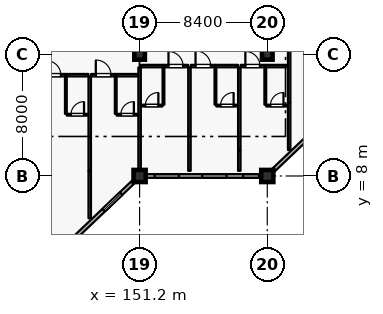
"""IFC4 building model, lengths in metres.
Left out: names, types, materials, properties, quantities, classifications, styles, units other than length and angle.
Written with IfcOpenShell. Run it as: python <this file> out.ifc"""

import sys

from ifc_helpers import new_model, si_unit, direction, frame, frame_2d, origin, origin_2d, place, context, subcontext, project, spatial, rectangle, extrude, element, fill, save


model = new_model("IFC4")
c1 = context("Model", 3, precision=1e-05, world=origin(), true_north=direction((0.0, 1.0)))
c2 = subcontext(c1, "Body", "Model", "MODEL_VIEW")
j1 = project(units=[si_unit("LENGTHUNIT", "METRE"), si_unit("PLANEANGLEUNIT", "RADIAN")], contexts=[c1])
p1 = place(None, origin())
s1 = spatial("IfcSite", under=j1, at=p1, CompositionType="ELEMENT")
p2 = place(p1, origin())
s2 = spatial("IfcBuilding", under=s1, at=p2, CompositionType="ELEMENT")
p3 = place(p2, frame((0.0, 0.0, 16.2)))
s3 = spatial("IfcBuildingStorey", under=s2, at=p3, CompositionType="ELEMENT", Elevation=16.2)
for number, where, z_axis, x_axis in (
    (1, (151.2, 8.0, 0.0), (0.0, 0.0, 1.0), (1.0, 0.0, 0.0)),
    (2, (159.6, 8.0, 0.0), (0.0, 0.0, 1.0), (1.0, 0.0, 0.0)),
):
    element("IfcColumn", number, at=place(p3, frame(where, z_axis=z_axis, x_axis=x_axis)), inside=s3, PredefinedType="COLUMN", context=c2, shape_type="SweptSolid", body=[
        extrude(rectangle(XDim=0.8, YDim=0.8, at=origin_2d()), origin(), (0.0, 0.0, 1.0), 4.8),
    ])
for number, where, z_axis, x_axis in (
    (3, (151.2, 16.0, 0.0), (0.0, 0.0, 1.0), (1.0, 0.0, 0.0)),
    (4, (159.6, 16.0, 0.0), (0.0, 0.0, 1.0), (1.0, 0.0, 0.0)),
):
    element("IfcColumn", number, at=place(p3, frame(where, z_axis=z_axis, x_axis=x_axis)), inside=s3, PredefinedType="COLUMN", context=c2, shape_type="SweptSolid", body=[
        extrude(rectangle(XDim=0.7, YDim=0.7, at=origin_2d()), origin(), (0.0, 0.0, 1.0), 4.8),
    ])
p4 = place(p3, frame((150.8, 7.619, 0.0), z_axis=(0.0, 0.0, 1.0), x_axis=(-0.724156739794, -0.689635422677, 0.0)))
e5 = element("IfcWall", 5, at=p4, inside=s3, PredefinedType="SOLIDWALL", context=c2, shape_type="SweptSolid", body=[
    extrude(rectangle(XDim=10.495, YDim=0.24, at=frame_2d((5.248, 0.0))), origin(), (0.0, 0.0, 1.0), 4.13),
])
p5 = place(p4, frame((1.12, 0.0, 0.8)))
e6 = element("IfcOpeningElement", 6, at=p5, cuts=e5, PredefinedType="OPENING", context=c2, shape_type="SweptSolid", body=[
    extrude(rectangle(XDim=1.6, YDim=1.6, at=frame_2d((0.8, 0.8))), frame((0.0, 0.13, 0.0), z_axis=(0.0, -1.0, 0.0), x_axis=(1.0, 0.0, 0.0)), (0.0, 0.0, 1.0), 0.26),
])
p6 = place(p4, frame((5.442, 0.0, 0.8)))
e7 = element("IfcOpeningElement", 7, at=p6, cuts=e5, PredefinedType="OPENING", context=c2, shape_type="SweptSolid", body=[
    extrude(rectangle(XDim=1.6, YDim=1.6, at=frame_2d((0.8, 0.8))), frame((0.0, 0.13, 0.0), z_axis=(0.0, -1.0, 0.0), x_axis=(1.0, 0.0, 0.0)), (0.0, 0.0, 1.0), 0.26),
])
p7 = place(p4, frame((8.77, 0.0, 0.8)))
e8 = element("IfcOpeningElement", 8, at=p7, cuts=e5, PredefinedType="OPENING", context=c2, shape_type="SweptSolid", body=[
    extrude(rectangle(XDim=1.6, YDim=1.6, at=frame_2d((0.8, 0.8))), frame((0.0, 0.13, 0.0), z_axis=(0.0, -1.0, 0.0), x_axis=(1.0, 0.0, 0.0)), (0.0, 0.0, 1.0), 0.26),
])
p8 = place(p3, frame((159.2, 8.0, 0.0), z_axis=(0.0, 0.0, 1.0), x_axis=(-1.0, 0.0, 0.0)))
e9 = element("IfcWall", 9, at=p8, inside=s3, PredefinedType="SOLIDWALL", context=c2, shape_type="SweptSolid", body=[
    extrude(rectangle(XDim=7.6, YDim=0.24, at=frame_2d((3.8, 0.0))), origin(), (0.0, 0.0, 1.0), 4.13),
])
p9 = place(p8, frame((0.145, 0.0, 0.8)))
e10 = element("IfcOpeningElement", 10, at=p9, cuts=e9, PredefinedType="OPENING", context=c2, shape_type="SweptSolid", body=[
    extrude(rectangle(XDim=1.05, YDim=1.65, at=frame_2d((0.525, 0.825))), frame((0.0, 0.13, 0.0), z_axis=(0.0, -1.0, 0.0), x_axis=(1.0, 0.0, 0.0)), (0.0, 0.0, 1.0), 0.26),
])
p10 = place(p8, frame((2.28, 0.0, 0.8)))
e11 = element("IfcOpeningElement", 11, at=p10, cuts=e9, PredefinedType="OPENING", context=c2, shape_type="SweptSolid", body=[
    extrude(rectangle(XDim=1.6, YDim=1.6, at=frame_2d((0.8, 0.8))), frame((0.0, 0.13, 0.0), z_axis=(0.0, -1.0, 0.0), x_axis=(1.0, 0.0, 0.0)), (0.0, 0.0, 1.0), 0.26),
])
p11 = place(p8, frame((5.41, 0.0, 0.8)))
e12 = element("IfcOpeningElement", 12, at=p11, cuts=e9, PredefinedType="OPENING", context=c2, shape_type="SweptSolid", body=[
    extrude(rectangle(XDim=1.6, YDim=1.6, at=frame_2d((0.8, 0.8))), frame((0.0, 0.13, 0.0), z_axis=(0.0, -1.0, 0.0), x_axis=(1.0, 0.0, 0.0)), (0.0, 0.0, 1.0), 0.26),
])
p12 = place(p3, frame((167.6, 15.619, 0.0), z_axis=(0.0, 0.0, 1.0), x_axis=(-0.724156739794, -0.689635422677, 0.0)))
e13 = element("IfcWall", 13, at=p12, inside=s3, PredefinedType="SOLIDWALL", context=c2, shape_type="SweptSolid", body=[
    extrude(rectangle(XDim=10.495, YDim=0.24, at=frame_2d((5.248, 0.0))), origin(), (0.0, 0.0, 1.0), 4.13),
])
p13 = place(p12, frame((1.465, 0.0, 0.8)))
e14 = element("IfcOpeningElement", 14, at=p13, cuts=e13, PredefinedType="OPENING", context=c2, shape_type="SweptSolid", body=[
    extrude(rectangle(XDim=1.6, YDim=1.6, at=frame_2d((0.8, 0.8))), frame((0.0, 0.13, 0.0), z_axis=(0.0, -1.0, 0.0), x_axis=(1.0, 0.0, 0.0)), (0.0, 0.0, 1.0), 0.26),
])
p14 = place(p12, frame((5.994, 0.0, 0.8)))
e15 = element("IfcOpeningElement", 15, at=p14, cuts=e13, PredefinedType="OPENING", context=c2, shape_type="SweptSolid", body=[
    extrude(rectangle(XDim=1.6, YDim=1.6, at=frame_2d((0.8, 0.8))), frame((0.0, 0.13, 0.0), z_axis=(0.0, -1.0, 0.0), x_axis=(1.0, 0.0, 0.0)), (0.0, 0.0, 1.0), 0.26),
])
p15 = place(p3, frame((144.73, 14.63, 0.0), z_axis=(0.0, 0.0, 1.0), x_axis=(1.0, 0.0, 0.0)))
e16 = element("IfcWall", 16, at=p15, inside=s3, PredefinedType="PARTITIONING", context=c2, shape_type="SweptSolid", body=[
    extrude(rectangle(XDim=1.62, YDim=0.16, at=frame_2d((0.81, 0.0))), origin(), (0.0, 0.0, 1.0), 4.535),
])
p16 = place(p15, frame((0.33, 0.0, 0.0)))
e17 = element("IfcOpeningElement", 17, at=p16, cuts=e16, PredefinedType="OPENING", context=c2, shape_type="SweptSolid", body=[
    extrude(rectangle(XDim=0.96, YDim=2.2, at=frame_2d((0.48, 1.1))), frame((0.0, 0.09, 0.0), z_axis=(0.0, -1.0, 0.0), x_axis=(1.0, 0.0, 0.0)), (0.0, 0.0, 1.0), 0.18),
])
p17 = place(p3, frame((146.36, 14.63, 0.0), z_axis=(0.0, 0.0, 1.0), x_axis=(1.0, 0.0, 0.0)))
e18 = element("IfcWall", 18, at=p17, inside=s3, PredefinedType="PARTITIONING", context=c2, shape_type="SweptSolid", body=[
    extrude(rectangle(XDim=1.47, YDim=0.16, at=frame_2d((0.735, 0.0))), origin(), (0.0, 0.0, 1.0), 4.535),
])
p18 = place(p3, frame((146.35, 12.09, 0.0), z_axis=(0.0, 0.0, 1.0), x_axis=(0.0, 1.0, 0.0)))
e19 = element("IfcWall", 19, at=p18, inside=s3, PredefinedType="PARTITIONING", context=c2, shape_type="SweptSolid", body=[
    extrude(rectangle(XDim=2.45, YDim=0.115, at=frame_2d((1.225, 0.0))), origin(), (0.0, 0.0, 1.0), 4.535),
])
p19 = place(p3, frame((146.41, 12.03, 0.0), z_axis=(0.0, 0.0, 1.0), x_axis=(1.0, 0.0, 0.0)))
e20 = element("IfcWall", 20, at=p19, inside=s3, PredefinedType="PARTITIONING", context=c2, shape_type="SweptSolid", body=[
    extrude(rectangle(XDim=1.41, YDim=0.115, at=frame_2d((0.705, 0.0))), origin(), (0.0, 0.0, 1.0), 4.535),
])
p20 = place(p19, frame((0.275, 0.0, 0.0)))
e21 = element("IfcOpeningElement", 21, at=p20, cuts=e20, PredefinedType="OPENING", context=c2, shape_type="SweptSolid", body=[
    extrude(rectangle(XDim=0.86, YDim=2.12, at=frame_2d((0.43, 1.06))), frame((0.0, 0.067, 0.0), z_axis=(0.0, -1.0, 0.0), x_axis=(1.0, 0.0, 0.0)), (0.0, 0.0, 1.0), 0.135),
])
p21 = place(p3, frame((147.92, 5.22, 0.0), z_axis=(0.0, 0.0, 1.0), x_axis=(0.0, 1.0, 0.0)))
e22 = element("IfcWall", 22, at=p21, inside=s3, PredefinedType="PARTITIONING", context=c2, shape_type="SweptSolid", body=[
    extrude(rectangle(XDim=3.11, YDim=0.16, at=frame_2d((1.555, 0.0))), origin(), (0.0, 0.0, 1.0), 4.535),
])
p22 = place(p3, frame((148.01, 14.63, 0.0), z_axis=(0.0, 0.0, 1.0), x_axis=(1.0, 0.0, 0.0)))
e23 = element("IfcWall", 23, at=p22, inside=s3, PredefinedType="PARTITIONING", context=c2, shape_type="SweptSolid", body=[
    extrude(rectangle(XDim=1.62, YDim=0.16, at=frame_2d((0.81, 0.0))), origin(), (0.0, 0.0, 1.0), 4.535),
])
p23 = place(p22, frame((0.31, 0.0, 0.0)))
e24 = element("IfcOpeningElement", 24, at=p23, cuts=e23, PredefinedType="OPENING", context=c2, shape_type="SweptSolid", body=[
    extrude(rectangle(XDim=1.0, YDim=2.25, at=frame_2d((0.5, 1.125))), frame((0.0, 0.09, 0.0), z_axis=(0.0, -1.0, 0.0), x_axis=(1.0, 0.0, 0.0)), (0.0, 0.0, 1.0), 0.18),
])
p24 = place(p3, frame((149.64, 14.63, 0.0), z_axis=(0.0, 0.0, 1.0), x_axis=(1.0, 0.0, 0.0)))
e25 = element("IfcWall", 25, at=p24, inside=s3, PredefinedType="PARTITIONING", context=c2, shape_type="SweptSolid", body=[
    extrude(rectangle(XDim=1.47, YDim=0.16, at=frame_2d((0.735, 0.0))), origin(), (0.0, 0.0, 1.0), 4.535),
])
p25 = place(p3, frame((149.63, 12.09, 0.0), z_axis=(0.0, 0.0, 1.0), x_axis=(0.0, 1.0, 0.0)))
e26 = element("IfcWall", 26, at=p25, inside=s3, PredefinedType="PARTITIONING", context=c2, shape_type="SweptSolid", body=[
    extrude(rectangle(XDim=2.45, YDim=0.115, at=frame_2d((1.225, 0.0))), origin(), (0.0, 0.0, 1.0), 4.535),
])
p26 = place(p3, frame((149.69, 12.03, 0.0), z_axis=(0.0, 0.0, 1.0), x_axis=(1.0, 0.0, 0.0)))
e27 = element("IfcWall", 27, at=p26, inside=s3, PredefinedType="PARTITIONING", context=c2, shape_type="SweptSolid", body=[
    extrude(rectangle(XDim=1.41, YDim=0.115, at=frame_2d((0.705, 0.0))), origin(), (0.0, 0.0, 1.0), 4.535),
])
p27 = place(p26, frame((0.275, 0.0, 0.0)))
e28 = element("IfcOpeningElement", 28, at=p27, cuts=e27, PredefinedType="OPENING", context=c2, shape_type="SweptSolid", body=[
    extrude(rectangle(XDim=0.86, YDim=2.12, at=frame_2d((0.43, 1.06))), frame((0.0, 0.067, 0.0), z_axis=(0.0, -1.0, 0.0), x_axis=(1.0, 0.0, 0.0)), (0.0, 0.0, 1.0), 0.135),
])
p28 = place(p3, frame((147.92, 8.34, 0.0), z_axis=(0.0, 0.0, 1.0), x_axis=(0.0, 1.0, 0.0)))
e29 = element("IfcWall", 29, at=p28, inside=s3, PredefinedType="PARTITIONING", context=c2, shape_type="SweptSolid", body=[
    extrude(rectangle(XDim=6.2, YDim=0.16, at=frame_2d((3.1, 0.0))), origin(), (0.0, 0.0, 1.0), 4.535),
])
p29 = place(p3, frame((151.29, 15.23, 0.0), z_axis=(0.0, 0.0, 1.0), x_axis=(1.0, 0.0, 0.0)))
e30 = element("IfcWall", 30, at=p29, inside=s3, PredefinedType="PARTITIONING", context=c2, shape_type="SweptSolid", body=[
    extrude(rectangle(XDim=1.47, YDim=0.16, at=frame_2d((0.735, 0.0))), origin(), (0.0, 0.0, 1.0), 4.535),
])
p30 = place(p3, frame((152.77, 15.23, 0.0), z_axis=(0.0, 0.0, 1.0), x_axis=(1.0, 0.0, 0.0)))
e31 = element("IfcWall", 31, at=p30, inside=s3, PredefinedType="PARTITIONING", context=c2, shape_type="SweptSolid", body=[
    extrude(rectangle(XDim=1.62, YDim=0.16, at=frame_2d((0.81, 0.0))), origin(), (0.0, 0.0, 1.0), 4.535),
])
p31 = place(p30, frame((0.33, 0.0, 0.0)))
e32 = element("IfcOpeningElement", 32, at=p31, cuts=e31, PredefinedType="OPENING", context=c2, shape_type="SweptSolid", body=[
    extrude(rectangle(XDim=0.96, YDim=2.2, at=frame_2d((0.48, 1.1))), frame((0.0, 0.09, 0.0), z_axis=(0.0, -1.0, 0.0), x_axis=(1.0, 0.0, 0.0)), (0.0, 0.0, 1.0), 0.18),
])
p32 = place(p3, frame((152.77, 12.69, 0.0), z_axis=(0.0, 0.0, 1.0), x_axis=(0.0, 1.0, 0.0)))
e33 = element("IfcWall", 33, at=p32, inside=s3, PredefinedType="PARTITIONING", context=c2, shape_type="SweptSolid", body=[
    extrude(rectangle(XDim=2.45, YDim=0.115, at=frame_2d((1.225, 0.0))), origin(), (0.0, 0.0, 1.0), 4.535),
])
p33 = place(p3, frame((151.3, 12.63, 0.0), z_axis=(0.0, 0.0, 1.0), x_axis=(1.0, 0.0, 0.0)))
e34 = element("IfcWall", 34, at=p33, inside=s3, PredefinedType="PARTITIONING", context=c2, shape_type="SweptSolid", body=[
    extrude(rectangle(XDim=1.41, YDim=0.115, at=frame_2d((0.705, 0.0))), origin(), (0.0, 0.0, 1.0), 4.535),
])
p34 = place(p33, frame((0.275, 0.0, 0.0)))
e35 = element("IfcOpeningElement", 35, at=p34, cuts=e34, PredefinedType="OPENING", context=c2, shape_type="SweptSolid", body=[
    extrude(rectangle(XDim=0.86, YDim=2.12, at=frame_2d((0.43, 1.06))), frame((0.0, 0.067, 0.0), z_axis=(0.0, -1.0, 0.0), x_axis=(1.0, 0.0, 0.0)), (0.0, 0.0, 1.0), 0.135),
])
p35 = place(p3, frame((151.2, 8.34, 0.0), z_axis=(0.0, 0.0, 1.0), x_axis=(0.0, 1.0, 0.0)))
e36 = element("IfcWall", 36, at=p35, inside=s3, PredefinedType="PARTITIONING", context=c2, shape_type="SweptSolid", body=[
    extrude(rectangle(XDim=6.8, YDim=0.16, at=frame_2d((3.4, 0.0))), origin(), (0.0, 0.0, 1.0), 3.98),
])
p36 = place(p3, frame((154.57, 15.23, 0.0), z_axis=(0.0, 0.0, 1.0), x_axis=(1.0, 0.0, 0.0)))
e37 = element("IfcWall", 37, at=p36, inside=s3, PredefinedType="PARTITIONING", context=c2, shape_type="SweptSolid", body=[
    extrude(rectangle(XDim=1.62, YDim=0.16, at=frame_2d((0.81, 0.0))), origin(), (0.0, 0.0, 1.0), 4.535),
])
p37 = place(p36, frame((0.31, 0.0, 0.0)))
e38 = element("IfcOpeningElement", 38, at=p37, cuts=e37, PredefinedType="OPENING", context=c2, shape_type="SweptSolid", body=[
    extrude(rectangle(XDim=1.0, YDim=2.25, at=frame_2d((0.5, 1.125))), frame((0.0, 0.09, 0.0), z_axis=(0.0, -1.0, 0.0), x_axis=(1.0, 0.0, 0.0)), (0.0, 0.0, 1.0), 0.18),
])
p38 = place(p3, frame((156.2, 15.23, 0.0), z_axis=(0.0, 0.0, 1.0), x_axis=(1.0, 0.0, 0.0)))
e39 = element("IfcWall", 39, at=p38, inside=s3, PredefinedType="PARTITIONING", context=c2, shape_type="SweptSolid", body=[
    extrude(rectangle(XDim=1.47, YDim=0.16, at=frame_2d((0.735, 0.0))), origin(), (0.0, 0.0, 1.0), 4.535),
])
p39 = place(p3, frame((156.19, 12.69, 0.0), z_axis=(0.0, 0.0, 1.0), x_axis=(0.0, 1.0, 0.0)))
e40 = element("IfcWall", 40, at=p39, inside=s3, PredefinedType="PARTITIONING", context=c2, shape_type="SweptSolid", body=[
    extrude(rectangle(XDim=2.45, YDim=0.115, at=frame_2d((1.225, 0.0))), origin(), (0.0, 0.0, 1.0), 4.535),
])
p40 = place(p3, frame((156.25, 12.63, 0.0), z_axis=(0.0, 0.0, 1.0), x_axis=(1.0, 0.0, 0.0)))
e41 = element("IfcWall", 41, at=p40, inside=s3, PredefinedType="PARTITIONING", context=c2, shape_type="SweptSolid", body=[
    extrude(rectangle(XDim=1.41, YDim=0.115, at=frame_2d((0.705, 0.0))), origin(), (0.0, 0.0, 1.0), 4.535),
])
p41 = place(p40, frame((0.275, 0.0, 0.0)))
e42 = element("IfcOpeningElement", 42, at=p41, cuts=e41, PredefinedType="OPENING", context=c2, shape_type="SweptSolid", body=[
    extrude(rectangle(XDim=0.86, YDim=2.12, at=frame_2d((0.43, 1.06))), frame((0.0, 0.067, 0.0), z_axis=(0.0, -1.0, 0.0), x_axis=(1.0, 0.0, 0.0)), (0.0, 0.0, 1.0), 0.135),
])
p42 = place(p3, frame((154.48, 8.34, 0.0), z_axis=(0.0, 0.0, 1.0), x_axis=(0.0, 1.0, 0.0)))
e43 = element("IfcWall", 43, at=p42, inside=s3, PredefinedType="PARTITIONING", context=c2, shape_type="SweptSolid", body=[
    extrude(rectangle(XDim=6.8, YDim=0.16, at=frame_2d((3.4, 0.0))), origin(), (0.0, 0.0, 1.0), 4.535),
])
p43 = place(p3, frame((157.76, 8.34, 0.0), z_axis=(0.0, 0.0, 1.0), x_axis=(0.0, 1.0, 0.0)))
e44 = element("IfcWall", 44, at=p43, inside=s3, PredefinedType="PARTITIONING", context=c2, shape_type="SweptSolid", body=[
    extrude(rectangle(XDim=1.36, YDim=0.16, at=frame_2d((0.68, 0.0))), origin(), (0.0, 0.0, 1.0), 4.535),
])
p44 = place(p3, frame((157.85, 15.23, 0.0), z_axis=(0.0, 0.0, 1.0), x_axis=(1.0, 0.0, 0.0)))
e45 = element("IfcWall", 45, at=p44, inside=s3, PredefinedType="PARTITIONING", context=c2, shape_type="SweptSolid", body=[
    extrude(rectangle(XDim=1.62, YDim=0.16, at=frame_2d((0.81, 0.0))), origin(), (0.0, 0.0, 1.0), 4.535),
])
p45 = place(p44, frame((0.308, 0.0, 0.0)))
e46 = element("IfcOpeningElement", 46, at=p45, cuts=e45, PredefinedType="OPENING", context=c2, shape_type="SweptSolid", body=[
    extrude(rectangle(XDim=0.96, YDim=2.2, at=frame_2d((0.48, 1.1))), frame((0.0, 0.09, 0.0), z_axis=(0.0, -1.0, 0.0), x_axis=(1.0, 0.0, 0.0)), (0.0, 0.0, 1.0), 0.18),
])
p46 = place(p3, frame((159.48, 15.23, 0.0), z_axis=(0.0, 0.0, 1.0), x_axis=(1.0, 0.0, 0.0)))
e47 = element("IfcWall", 47, at=p46, inside=s3, PredefinedType="PARTITIONING", context=c2, shape_type="SweptSolid", body=[
    extrude(rectangle(XDim=1.47, YDim=0.16, at=frame_2d((0.735, 0.0))), origin(), (0.0, 0.0, 1.0), 4.535),
])
p47 = place(p3, frame((159.47, 12.69, 0.0), z_axis=(0.0, 0.0, 1.0), x_axis=(0.0, 1.0, 0.0)))
e48 = element("IfcWall", 48, at=p47, inside=s3, PredefinedType="PARTITIONING", context=c2, shape_type="SweptSolid", body=[
    extrude(rectangle(XDim=2.45, YDim=0.115, at=frame_2d((1.225, 0.0))), origin(), (0.0, 0.0, 1.0), 4.535),
])
p48 = place(p3, frame((159.53, 12.63, 0.0), z_axis=(0.0, 0.0, 1.0), x_axis=(1.0, 0.0, 0.0)))
e49 = element("IfcWall", 49, at=p48, inside=s3, PredefinedType="PARTITIONING", context=c2, shape_type="SweptSolid", body=[
    extrude(rectangle(XDim=1.41, YDim=0.115, at=frame_2d((0.705, 0.0))), origin(), (0.0, 0.0, 1.0), 4.535),
])
p49 = place(p48, frame((0.275, 0.0, 0.0)))
e50 = element("IfcOpeningElement", 50, at=p49, cuts=e49, PredefinedType="OPENING", context=c2, shape_type="SweptSolid", body=[
    extrude(rectangle(XDim=0.86, YDim=2.12, at=frame_2d((0.43, 1.06))), frame((0.0, 0.067, 0.0), z_axis=(0.0, -1.0, 0.0), x_axis=(1.0, 0.0, 0.0)), (0.0, 0.0, 1.0), 0.135),
])
p50 = place(p3, frame((157.76, 9.71, 0.0), z_axis=(0.0, 0.0, 1.0), x_axis=(0.0, 1.0, 0.0)))
e51 = element("IfcWall", 51, at=p50, inside=s3, PredefinedType="PARTITIONING", context=c2, shape_type="SweptSolid", body=[
    extrude(rectangle(XDim=5.43, YDim=0.16, at=frame_2d((2.715, 0.0))), origin(), (0.0, 0.0, 1.0), 4.535),
])
p51 = place(p3, frame((161.04, 9.71, 0.0), z_axis=(0.0, 0.0, 1.0), x_axis=(0.0, 1.0, 0.0)))
e52 = element("IfcWall", 52, at=p51, inside=s3, PredefinedType="PARTITIONING", context=c2, shape_type="SweptSolid", body=[
    extrude(rectangle(XDim=3.12, YDim=0.16, at=frame_2d((1.56, 0.0))), origin(), (0.0, 0.0, 1.0), 4.535),
])
p52 = place(p3, frame((161.04, 12.84, 0.0), z_axis=(0.0, 0.0, 1.0), x_axis=(0.0, 1.0, 0.0)))
e53 = element("IfcWall", 53, at=p52, inside=s3, PredefinedType="PARTITIONING", context=c2, shape_type="SweptSolid", body=[
    extrude(rectangle(XDim=9.55, YDim=0.16, at=frame_2d((4.775, 0.0))), origin(), (0.0, 0.0, 1.0), 4.535),
])
p53 = place(p5, origin())
e54 = element("IfcWindow", 54, at=p53, inside=s3, PartitioningType="SINGLE_PANEL", PredefinedType="WINDOW", context=c2, shape_type="SweptSolid", body=[
    extrude(rectangle(XDim=1.6, YDim=1.6, at=frame_2d((0.8, 0.8))), frame((0.0, 0.03, 0.0), z_axis=(0.0, -1.0, 0.0), x_axis=(1.0, 0.0, 0.0)), (0.0, 0.0, 1.0), 0.06),
])
fill(e6, e54)
p54 = place(p9, origin())
e55 = element("IfcWindow", 55, at=p54, inside=s3, PartitioningType="SINGLE_PANEL", PredefinedType="WINDOW", context=c2, shape_type="SweptSolid", body=[
    extrude(rectangle(XDim=1.05, YDim=1.65, at=frame_2d((0.525, 0.825))), frame((0.0, 0.03, 0.0), z_axis=(0.0, -1.0, 0.0), x_axis=(1.0, 0.0, 0.0)), (0.0, 0.0, 1.0), 0.06),
])
fill(e10, e55)
p55 = place(p10, origin())
e56 = element("IfcWindow", 56, at=p55, inside=s3, PartitioningType="SINGLE_PANEL", PredefinedType="WINDOW", context=c2, shape_type="SweptSolid", body=[
    extrude(rectangle(XDim=1.6, YDim=1.6, at=frame_2d((0.8, 0.8))), frame((0.0, 0.03, 0.0), z_axis=(0.0, -1.0, 0.0), x_axis=(1.0, 0.0, 0.0)), (0.0, 0.0, 1.0), 0.06),
])
fill(e11, e56)
p56 = place(p11, origin())
e57 = element("IfcWindow", 57, at=p56, inside=s3, PartitioningType="SINGLE_PANEL", PredefinedType="WINDOW", context=c2, shape_type="SweptSolid", body=[
    extrude(rectangle(XDim=1.6, YDim=1.6, at=frame_2d((0.8, 0.8))), frame((0.0, 0.03, 0.0), z_axis=(0.0, -1.0, 0.0), x_axis=(1.0, 0.0, 0.0)), (0.0, 0.0, 1.0), 0.06),
])
fill(e12, e57)
p57 = place(p16, origin())
e58 = element("IfcDoor", 58, at=p57, inside=s3, OperationType="SINGLE_SWING_LEFT", PredefinedType="DOOR", context=c2, shape_type="SweptSolid", body=[
    extrude(rectangle(XDim=0.96, YDim=2.2, at=frame_2d((0.48, 1.1))), frame((0.0, 0.025, 0.0), z_axis=(0.0, -1.0, 0.0), x_axis=(1.0, 0.0, 0.0)), (0.0, 0.0, 1.0), 0.05),
])
fill(e17, e58)
p58 = place(p20, origin())
e59 = element("IfcDoor", 59, at=p58, inside=s3, OperationType="SINGLE_SWING_RIGHT", PredefinedType="DOOR", context=c2, shape_type="SweptSolid", body=[
    extrude(rectangle(XDim=0.86, YDim=2.12, at=frame_2d((0.43, 1.06))), frame((0.0, 0.025, 0.0), z_axis=(0.0, -1.0, 0.0), x_axis=(1.0, 0.0, 0.0)), (0.0, 0.0, 1.0), 0.05),
])
fill(e21, e59)
p59 = place(p23, origin())
e60 = element("IfcDoor", 60, at=p59, inside=s3, OperationType="SINGLE_SWING_LEFT", PredefinedType="DOOR", context=c2, shape_type="SweptSolid", body=[
    extrude(rectangle(XDim=1.0, YDim=2.25, at=frame_2d((0.5, 1.125))), frame((0.0, 0.025, 0.0), z_axis=(0.0, -1.0, 0.0), x_axis=(1.0, 0.0, 0.0)), (0.0, 0.0, 1.0), 0.05),
])
fill(e24, e60)
p60 = place(p27, origin())
e61 = element("IfcDoor", 61, at=p60, inside=s3, OperationType="SINGLE_SWING_RIGHT", PredefinedType="DOOR", context=c2, shape_type="SweptSolid", body=[
    extrude(rectangle(XDim=0.86, YDim=2.12, at=frame_2d((0.43, 1.06))), frame((0.0, 0.025, 0.0), z_axis=(0.0, -1.0, 0.0), x_axis=(1.0, 0.0, 0.0)), (0.0, 0.0, 1.0), 0.05),
])
fill(e28, e61)
p61 = place(p31, origin())
e62 = element("IfcDoor", 62, at=p61, inside=s3, OperationType="SINGLE_SWING_LEFT", PredefinedType="DOOR", context=c2, shape_type="SweptSolid", body=[
    extrude(rectangle(XDim=0.96, YDim=2.2, at=frame_2d((0.48, 1.1))), frame((0.0, 0.025, 0.0), z_axis=(0.0, -1.0, 0.0), x_axis=(1.0, 0.0, 0.0)), (0.0, 0.0, 1.0), 0.05),
])
fill(e32, e62)
p62 = place(p34, origin())
e63 = element("IfcDoor", 63, at=p62, inside=s3, OperationType="SINGLE_SWING_RIGHT", PredefinedType="DOOR", context=c2, shape_type="SweptSolid", body=[
    extrude(rectangle(XDim=0.86, YDim=2.12, at=frame_2d((0.43, 1.06))), frame((0.0, 0.025, 0.0), z_axis=(0.0, -1.0, 0.0), x_axis=(1.0, 0.0, 0.0)), (0.0, 0.0, 1.0), 0.05),
])
fill(e35, e63)
p63 = place(p37, origin())
e64 = element("IfcDoor", 64, at=p63, inside=s3, OperationType="SINGLE_SWING_LEFT", PredefinedType="DOOR", context=c2, shape_type="SweptSolid", body=[
    extrude(rectangle(XDim=1.0, YDim=2.25, at=frame_2d((0.5, 1.125))), frame((0.0, 0.025, 0.0), z_axis=(0.0, -1.0, 0.0), x_axis=(1.0, 0.0, 0.0)), (0.0, 0.0, 1.0), 0.05),
])
fill(e38, e64)
p64 = place(p41, origin())
e65 = element("IfcDoor", 65, at=p64, inside=s3, OperationType="SINGLE_SWING_RIGHT", PredefinedType="DOOR", context=c2, shape_type="SweptSolid", body=[
    extrude(rectangle(XDim=0.86, YDim=2.12, at=frame_2d((0.43, 1.06))), frame((0.0, 0.025, 0.0), z_axis=(0.0, -1.0, 0.0), x_axis=(1.0, 0.0, 0.0)), (0.0, 0.0, 1.0), 0.05),
])
fill(e42, e65)
p65 = place(p45, origin())
e66 = element("IfcDoor", 66, at=p65, inside=s3, OperationType="SINGLE_SWING_LEFT", PredefinedType="DOOR", context=c2, shape_type="SweptSolid", body=[
    extrude(rectangle(XDim=0.96, YDim=2.2, at=frame_2d((0.48, 1.1))), frame((0.0, 0.025, 0.0), z_axis=(0.0, -1.0, 0.0), x_axis=(1.0, 0.0, 0.0)), (0.0, 0.0, 1.0), 0.05),
])
fill(e46, e66)
p66 = place(p49, origin())
e67 = element("IfcDoor", 67, at=p66, inside=s3, OperationType="SINGLE_SWING_RIGHT", PredefinedType="DOOR", context=c2, shape_type="SweptSolid", body=[
    extrude(rectangle(XDim=0.86, YDim=2.12, at=frame_2d((0.43, 1.06))), frame((0.0, 0.025, 0.0), z_axis=(0.0, -1.0, 0.0), x_axis=(1.0, 0.0, 0.0)), (0.0, 0.0, 1.0), 0.05),
])
fill(e50, e67)
save(model, sys.argv[1])
